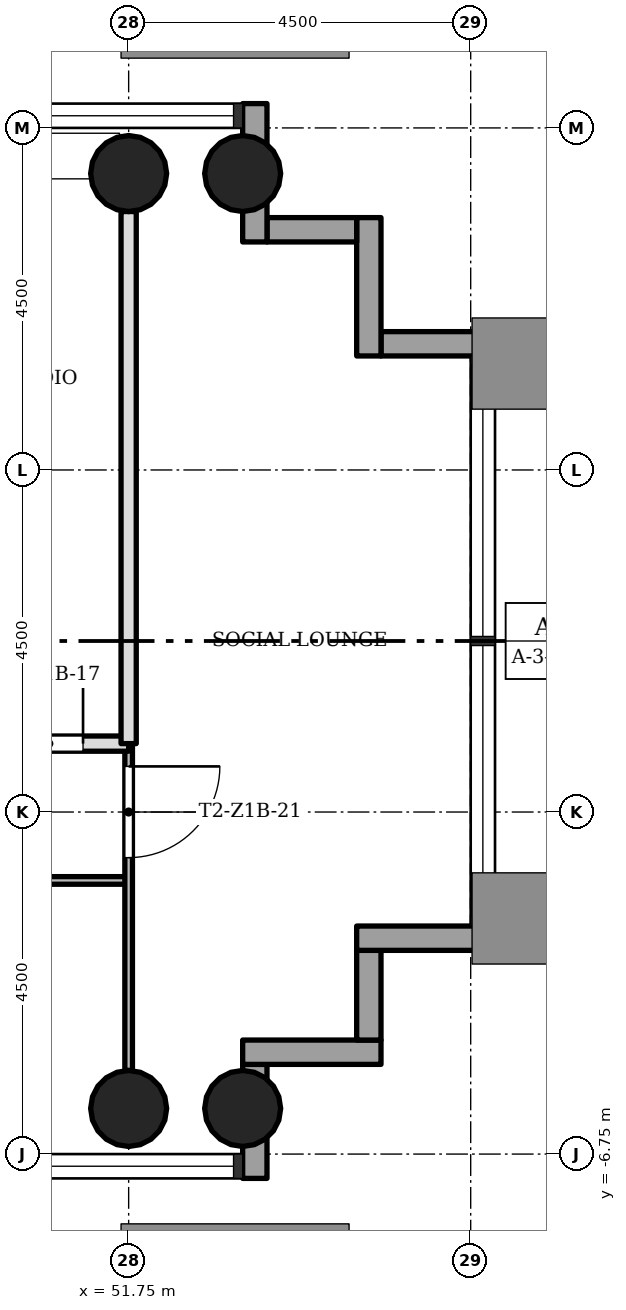
"""IFC4 building model, lengths in metres.
Left out: names, types, materials, properties, quantities, classifications, styles, units other than length and angle.
Written with IfcOpenShell. Run it as: python <this file> out.ifc"""

import sys

from ifc_helpers import new_model, si_unit, direction, frame, frame_2d, origin, origin_2d, place, context, subcontext, project, spatial, rectangle, hollow_circle, extrude, element, fill, save


model = new_model("IFC4")
c1 = context("Model", 3, precision=1e-05, world=origin(), true_north=direction((0.0, 1.0)))
c2 = subcontext(c1, "Body", "Model", "MODEL_VIEW")
j1 = project(units=[si_unit("LENGTHUNIT", "METRE"), si_unit("PLANEANGLEUNIT", "RADIAN")], contexts=[c1])
p1 = place(None, origin())
s1 = spatial("IfcSite", under=j1, at=p1, CompositionType="ELEMENT")
p2 = place(p1, origin())
s2 = spatial("IfcBuilding", under=s1, at=p2, CompositionType="ELEMENT")
p3 = place(p2, frame((0.0, 0.0, 38.1)))
s3 = spatial("IfcBuildingStorey", under=s2, at=p3, CompositionType="ELEMENT", Elevation=38.1)
for number, where, z_axis, x_axis in (
    (1, (51.75, -6.15, 0.0), (0.0, 0.0, 1.0), (1.0, 0.0, 0.0)),
    (2, (51.75, 6.15, 0.0), (0.0, 0.0, 1.0), (1.0, 0.0, 0.0)),
    (3, (53.25, -6.15, 0.0), (0.0, 0.0, 1.0), (1.0, 0.0, 0.0)),
    (4, (53.25, 6.15, 0.0), (0.0, 0.0, 1.0), (1.0, 0.0, 0.0)),
):
    element("IfcColumn", number, at=place(p3, frame(where, z_axis=z_axis, x_axis=x_axis)), inside=s3, PredefinedType="COLUMN", context=c2, shape_type="SweptSolid", body=[
        extrude(hollow_circle(Radius=0.5, WallThickness=0.036, at=origin_2d()), origin(), (0.0, 0.0, 1.0), 3.4),
    ])
p4 = place(p3, frame((53.41, -7.07, -0.3), z_axis=(0.0, 0.0, 1.0), x_axis=(0.0, 1.0, 0.0)))
e5 = element("IfcWall", 5, at=p4, inside=s3, PredefinedType="STANDARD", context=c2, shape_type="SweptSolid", body=[
    extrude(rectangle(XDim=1.5, YDim=0.32, at=frame_2d((0.75, 0.0))), origin(), (0.0, 0.0, 1.0), 3.4),
])
p5 = place(p3, frame((53.25, -5.41, -0.3), z_axis=(0.0, 0.0, 1.0), x_axis=(1.0, 0.0, 0.0)))
e6 = element("IfcWall", 6, at=p5, inside=s3, PredefinedType="STANDARD", context=c2, shape_type="SweptSolid", body=[
    extrude(rectangle(XDim=1.82, YDim=0.32, at=frame_2d((0.91, 0.0))), origin(), (0.0, 0.0, 1.0), 3.4),
])
p6 = place(p3, frame((54.91, -5.25, -0.3), z_axis=(0.0, 0.0, 1.0), x_axis=(0.0, 1.0, 0.0)))
e7 = element("IfcWall", 7, at=p6, inside=s3, PredefinedType="STANDARD", context=c2, shape_type="SweptSolid", body=[
    extrude(rectangle(XDim=1.18, YDim=0.32, at=frame_2d((0.59, 0.0))), origin(), (0.0, 0.0, 1.0), 3.4),
])
p7 = place(p3, frame((54.75, -3.91, -0.3), z_axis=(0.0, 0.0, 1.0), x_axis=(1.0, 0.0, 0.0)))
e8 = element("IfcWall", 8, at=p7, inside=s3, PredefinedType="STANDARD", context=c2, shape_type="SweptSolid", body=[
    extrude(rectangle(XDim=1.82, YDim=0.32, at=frame_2d((0.91, 0.0))), origin(), (0.0, 0.0, 1.0), 3.4),
])
p8 = place(p3, frame((56.57, 3.91, -0.3), z_axis=(0.0, 0.0, 1.0), x_axis=(-1.0, 0.0, 0.0)))
e9 = element("IfcWall", 9, at=p8, inside=s3, PredefinedType="STANDARD", context=c2, shape_type="SweptSolid", body=[
    extrude(rectangle(XDim=1.5, YDim=0.32, at=frame_2d((0.75, 0.0))), origin(), (0.0, 0.0, 1.0), 3.4),
])
p9 = place(p3, frame((54.91, 3.75, -0.3), z_axis=(0.0, 0.0, 1.0), x_axis=(0.0, 1.0, 0.0)))
e10 = element("IfcWall", 10, at=p9, inside=s3, PredefinedType="STANDARD", context=c2, shape_type="SweptSolid", body=[
    extrude(rectangle(XDim=1.82, YDim=0.32, at=frame_2d((0.91, 0.0))), origin(), (0.0, 0.0, 1.0), 3.4),
])
p10 = place(p3, frame((54.75, 5.41, -0.3), z_axis=(0.0, 0.0, 1.0), x_axis=(-1.0, 0.0, 0.0)))
e11 = element("IfcWall", 11, at=p10, inside=s3, PredefinedType="STANDARD", context=c2, shape_type="SweptSolid", body=[
    extrude(rectangle(XDim=1.18, YDim=0.32, at=frame_2d((0.59, 0.0))), origin(), (0.0, 0.0, 1.0), 3.4),
])
p11 = place(p3, frame((53.41, 5.25, -0.3), z_axis=(0.0, 0.0, 1.0), x_axis=(0.0, 1.0, 0.0)))
e12 = element("IfcWall", 12, at=p11, inside=s3, PredefinedType="STANDARD", context=c2, shape_type="SweptSolid", body=[
    extrude(rectangle(XDim=1.82, YDim=0.32, at=frame_2d((0.91, 0.0))), origin(), (0.0, 0.0, 1.0), 3.4),
])
p12 = place(p3, frame((51.75, -3.15, 0.0), z_axis=(0.0, 0.0, 1.0), x_axis=(-1.0, 0.0, 0.0)))
e13 = element("IfcWall", 13, at=p12, inside=s3, PredefinedType="PARTITIONING", context=c2, shape_type="SweptSolid", body=[
    extrude(rectangle(XDim=9.0, YDim=0.1, at=frame_2d((4.5, 0.0))), origin(), (0.0, 0.0, 1.0), 3.0),
])
p13 = place(p12, frame((6.3, 0.0, 0.0)))
e14 = element("IfcOpeningElement", 14, at=p13, cuts=e13, PredefinedType="OPENING", context=c2, shape_type="SweptSolid", body=[
    extrude(rectangle(XDim=0.9, YDim=2.1, at=frame_2d((0.45, 1.05))), frame((0.0, 0.06, 0.0), z_axis=(0.0, -1.0, 0.0), x_axis=(1.0, 0.0, 0.0)), (0.0, 0.0, 1.0), 0.12),
])
p14 = place(p12, frame((1.8, 0.0, 0.0)))
e15 = element("IfcOpeningElement", 15, at=p14, cuts=e13, PredefinedType="OPENING", context=c2, shape_type="SweptSolid", body=[
    extrude(rectangle(XDim=0.9, YDim=2.1, at=frame_2d((0.45, 1.05))), frame((0.0, 0.06, 0.0), z_axis=(0.0, -1.0, 0.0), x_axis=(1.0, 0.0, 0.0)), (0.0, 0.0, 1.0), 0.12),
])
p15 = place(p3, frame((51.75, -1.35, 0.0), z_axis=(0.0, 0.0, 1.0), x_axis=(-1.0, 0.0, 0.0)))
e16 = element("IfcWall", 16, at=p15, inside=s3, PredefinedType="SOLIDWALL", context=c2, shape_type="SweptSolid", body=[
    extrude(rectangle(XDim=4.5, YDim=0.2, at=frame_2d((2.25, 0.0))), origin(), (0.0, 0.0, 1.0), 3.0),
])
p16 = place(p15, frame((0.6, 0.0, 0.0)))
e17 = element("IfcOpeningElement", 17, at=p16, cuts=e16, PredefinedType="OPENING", context=c2, shape_type="SweptSolid", body=[
    extrude(rectangle(XDim=0.9, YDim=2.1, at=frame_2d((0.45, 1.05))), frame((0.0, 0.11, 0.0), z_axis=(0.0, -1.0, 0.0), x_axis=(1.0, 0.0, 0.0)), (0.0, 0.0, 1.0), 0.22),
])
p17 = place(p3, frame((51.75, -5.65, 0.0), z_axis=(0.0, 0.0, 1.0), x_axis=(0.0, 1.0, 0.0)))
e18 = element("IfcWall", 18, at=p17, inside=s3, PredefinedType="PARTITIONING", context=c2, shape_type="SweptSolid", body=[
    extrude(rectangle(XDim=4.3, YDim=0.1, at=frame_2d((2.15, 0.0))), origin(), (0.0, 0.0, 1.0), 3.0),
])
p18 = place(p17, frame((2.8, 0.0, 0.0)))
e19 = element("IfcOpeningElement", 19, at=p18, cuts=e18, PredefinedType="OPENING", context=c2, shape_type="SweptSolid", body=[
    extrude(rectangle(XDim=1.2, YDim=2.1, at=frame_2d((0.6, 1.05))), frame((0.0, 0.06, 0.0), z_axis=(0.0, -1.0, 0.0), x_axis=(1.0, 0.0, 0.0)), (0.0, 0.0, 1.0), 0.12),
])
p19 = place(p3, frame((51.75, -1.35, 0.0), z_axis=(0.0, 0.0, 1.0), x_axis=(0.0, 1.0, 0.0)))
e20 = element("IfcWall", 20, at=p19, inside=s3, PredefinedType="SOLIDWALL", context=c2, shape_type="SweptSolid", body=[
    extrude(rectangle(XDim=7.0, YDim=0.2, at=frame_2d((3.5, 0.0))), origin(), (0.0, 0.0, 1.0), 3.0),
])
p20 = place(p16, origin())
e21 = element("IfcDoor", 21, at=p20, inside=s3, OperationType="SINGLE_SWING_LEFT", PredefinedType="DOOR", context=c2, shape_type="SweptSolid", body=[
    extrude(rectangle(XDim=0.9, YDim=2.1, at=frame_2d((0.45, 1.05))), frame((0.0, 0.025, 0.0), z_axis=(0.0, -1.0, 0.0), x_axis=(1.0, 0.0, 0.0)), (0.0, 0.0, 1.0), 0.05),
])
fill(e17, e21)
p21 = place(p18, origin())
e22 = element("IfcDoor", 22, at=p21, inside=s3, OperationType="SINGLE_SWING_RIGHT", PredefinedType="DOOR", context=c2, shape_type="SweptSolid", body=[
    extrude(rectangle(XDim=1.2, YDim=2.1, at=frame_2d((0.6, 1.05))), frame((0.0, 0.025, 0.0), z_axis=(0.0, -1.0, 0.0), x_axis=(1.0, 0.0, 0.0)), (0.0, 0.0, 1.0), 0.05),
])
fill(e19, e22)
save(model, sys.argv[1])
